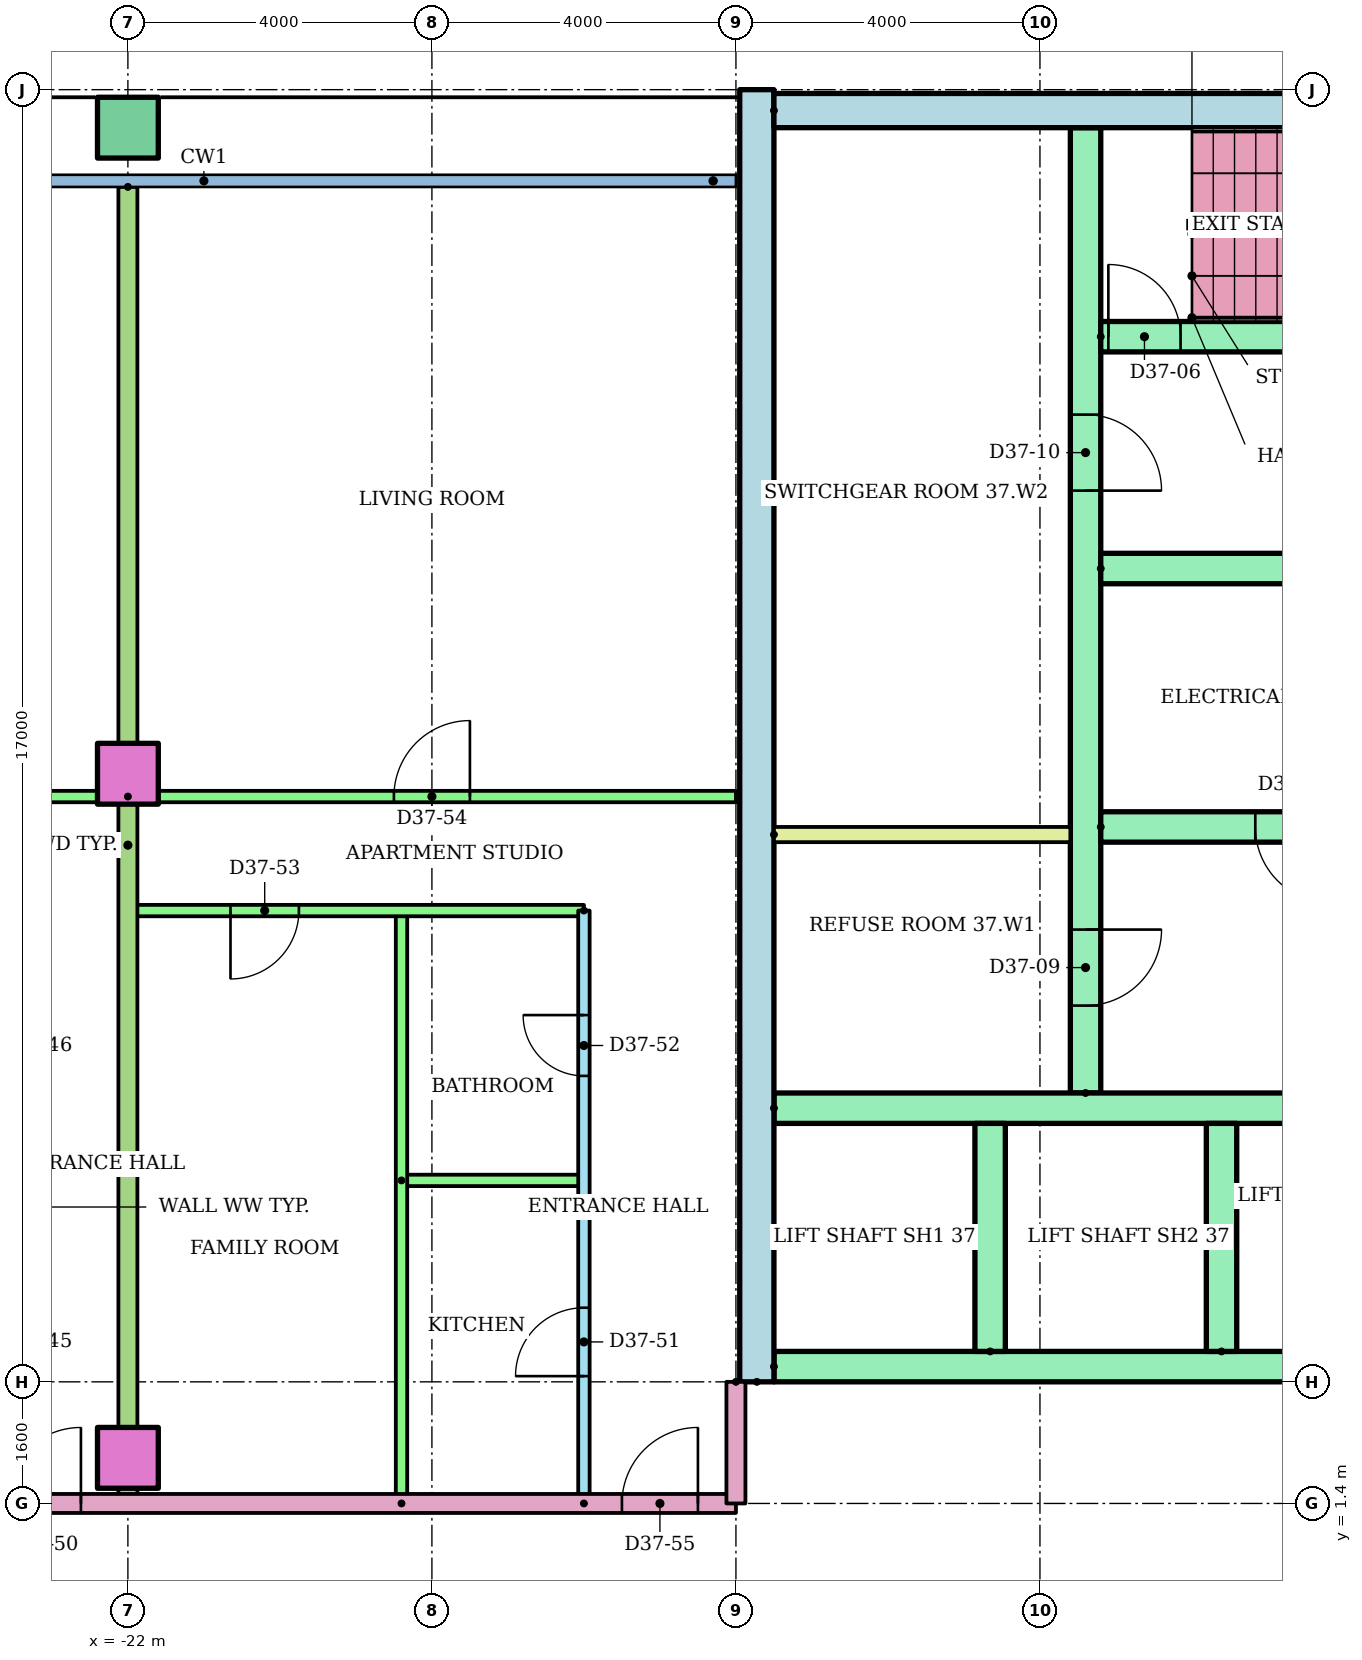
"""IFC4 building model, lengths in metres.
Left out: names, types, materials, properties, quantities, classifications, styles, units other than length and angle.
Written with IfcOpenShell. Run it as: python <this file> out.ifc"""

import sys

from ifc_helpers import new_model, si_unit, direction, frame, frame_2d, origin, origin_2d, place, context, subcontext, project, spatial, rectangle, hollow_rectangle, extrude, element, fill, save


model = new_model("IFC4")
c1 = context("Model", 3, precision=1e-05, world=origin(), true_north=direction((0.0, 1.0)))
c2 = subcontext(c1, "Body", "Model", "MODEL_VIEW")
j1 = project(units=[si_unit("LENGTHUNIT", "METRE"), si_unit("PLANEANGLEUNIT", "RADIAN")], contexts=[c1])
p1 = place(None, origin())
s1 = spatial("IfcSite", under=j1, at=p1, CompositionType="ELEMENT")
p2 = place(p1, origin())
s2 = spatial("IfcBuilding", under=s1, at=p2, CompositionType="ELEMENT")
p3 = place(p2, frame((0.0, 0.0, 142.2)))
s3 = spatial("IfcBuildingStorey", under=s2, at=p3, CompositionType="ELEMENT", Elevation=142.2)
for number, where in (
    (1, (-22.0, 2.0, 0.0)),
    (2, (-22.0, 11.0, 0.0)),
):
    element("IfcColumn", number, at=place(p3, frame(where)), inside=s3, PredefinedType="COLUMN", context=c2, shape_type="SweptSolid", body=[
        extrude(rectangle(XDim=0.8, YDim=0.8, at=origin_2d()), origin(), (0.0, 0.0, 1.0), 3.2),
    ])
p4 = place(p3, frame((-22.0, 19.5, 0.0)))
e3 = element("IfcColumn", 3, at=p4, inside=s3, PredefinedType="COLUMN", context=c2, shape_type="SweptSolid", body=[
    extrude(hollow_rectangle(XDim=0.8, YDim=0.8, WallThickness=0.04, at=origin_2d()), origin(), (0.0, 0.0, 1.0), 3.2),
])
p5 = place(p3, frame((-13.725, 3.0, 0.0), z_axis=(0.0, 0.0, 1.0), x_axis=(0.0, 1.0, 0.0)))
e4 = element("IfcWall", 4, at=p5, inside=s3, PredefinedType="SHEAR", context=c2, shape_type="SweptSolid", body=[
    extrude(rectangle(XDim=17.0, YDim=0.45, at=frame_2d((8.5, 0.0))), origin(), (0.0, 0.0, 1.0), 2.92),
])
p6 = place(p3, frame((-13.5, 19.725, 0.0)))
e5 = element("IfcWall", 5, at=p6, inside=s3, PredefinedType="SHEAR", context=c2, shape_type="SweptSolid", body=[
    extrude(rectangle(XDim=27.0, YDim=0.45, at=frame_2d((13.5, 0.0))), origin(), (0.0, 0.0, 1.0), 2.92),
])
p7 = place(p3, frame((-9.4, 6.8, 0.0), z_axis=(0.0, 0.0, 1.0), x_axis=(0.0, 1.0, 0.0)))
e6 = element("IfcWall", 6, at=p7, inside=s3, PredefinedType="SHEAR", context=c2, shape_type="SweptSolid", body=[
    extrude(rectangle(XDim=12.7, YDim=0.4, at=frame_2d((6.35, 0.0))), origin(), (0.0, 0.0, 1.0), 2.92),
])
p8 = place(p7, frame((1.15, 0.0, 0.0)))
e7 = element("IfcOpeningElement", 7, at=p8, cuts=e6, PredefinedType="OPENING", context=c2, shape_type="SweptSolid", body=[
    extrude(rectangle(XDim=1.0, YDim=2.1, at=frame_2d((0.5, 1.05))), frame((0.0, 0.21, 0.0), z_axis=(0.0, -1.0, 0.0), x_axis=(1.0, 0.0, 0.0)), (0.0, 0.0, 1.0), 0.42),
])
p9 = place(p7, frame((7.925, 0.0, 0.0)))
e8 = element("IfcOpeningElement", 8, at=p9, cuts=e6, PredefinedType="OPENING", context=c2, shape_type="SweptSolid", body=[
    extrude(rectangle(XDim=1.0, YDim=2.1, at=frame_2d((0.5, 1.05))), frame((0.0, 0.21, 0.0), z_axis=(0.0, -1.0, 0.0), x_axis=(1.0, 0.0, 0.0)), (0.0, 0.0, 1.0), 0.42),
])
p10 = place(p3, frame((-13.5, 3.2, 0.0)))
e9 = element("IfcWall", 9, at=p10, inside=s3, PredefinedType="SHEAR", context=c2, shape_type="SweptSolid", body=[
    extrude(rectangle(XDim=27.0, YDim=0.4, at=frame_2d((13.5, 0.0))), origin(), (0.0, 0.0, 1.0), 2.92),
])
p11 = place(p10, frame((6.861, 0.0, 0.0)))
e10 = element("IfcOpeningElement", 10, at=p11, cuts=e9, PredefinedType="OPENING", context=c2, shape_type="SweptSolid", body=[
    extrude(rectangle(XDim=1.1, YDim=2.1, at=frame_2d((0.55, 1.05))), frame((0.0, 0.21, 0.0), z_axis=(0.0, -1.0, 0.0), x_axis=(1.0, 0.0, 0.0)), (0.0, 0.0, 1.0), 0.42),
])
p12 = place(p10, frame((9.906, 0.0, 0.0)))
e11 = element("IfcOpeningElement", 11, at=p12, cuts=e9, PredefinedType="OPENING", context=c2, shape_type="SweptSolid", body=[
    extrude(rectangle(XDim=1.1, YDim=2.1, at=frame_2d((0.55, 1.05))), frame((0.0, 0.21, 0.0), z_axis=(0.0, -1.0, 0.0), x_axis=(1.0, 0.0, 0.0)), (0.0, 0.0, 1.0), 0.42),
])
p13 = place(p10, frame((15.994, 0.0, 0.0)))
e12 = element("IfcOpeningElement", 12, at=p13, cuts=e9, PredefinedType="OPENING", context=c2, shape_type="SweptSolid", body=[
    extrude(rectangle(XDim=1.1, YDim=2.1, at=frame_2d((0.55, 1.05))), frame((0.0, 0.21, 0.0), z_axis=(0.0, -1.0, 0.0), x_axis=(1.0, 0.0, 0.0)), (0.0, 0.0, 1.0), 0.42),
])
p14 = place(p10, frame((19.039, 0.0, 0.0)))
e13 = element("IfcOpeningElement", 13, at=p14, cuts=e9, PredefinedType="OPENING", context=c2, shape_type="SweptSolid", body=[
    extrude(rectangle(XDim=1.1, YDim=2.1, at=frame_2d((0.55, 1.05))), frame((0.0, 0.21, 0.0), z_axis=(0.0, -1.0, 0.0), x_axis=(1.0, 0.0, 0.0)), (0.0, 0.0, 1.0), 0.42),
])
p15 = place(p10, frame((12.6, 0.0, 0.0)))
e14 = element("IfcOpeningElement", 14, at=p15, cuts=e9, PredefinedType="OPENING", context=c2, shape_type="SweptSolid", body=[
    extrude(rectangle(XDim=1.8, YDim=2.1, at=frame_2d((0.9, 1.05))), frame((0.0, 0.21, 0.0), z_axis=(0.0, -1.0, 0.0), x_axis=(1.0, 0.0, 0.0)), (0.0, 0.0, 1.0), 0.42),
])
p16 = place(p3, frame((-13.5, 6.6, 0.0)))
e15 = element("IfcWall", 15, at=p16, inside=s3, PredefinedType="SHEAR", context=c2, shape_type="SweptSolid", body=[
    extrude(rectangle(XDim=11.978, YDim=0.4, at=frame_2d((5.989, 0.0))), origin(), (0.0, 0.0, 1.0), 2.92),
])
for number, where, z_axis, x_axis in (
    (16, (-10.656, 3.4, 0.0), (0.0, 0.0, 1.0), (0.0, 1.0, 0.0)),
    (17, (-7.611, 3.4, 0.0), (0.0, 0.0, 1.0), (0.0, 1.0, 0.0)),
):
    element("IfcWall", number, at=place(p3, frame(where, z_axis=z_axis, x_axis=x_axis)), inside=s3, PredefinedType="SHEAR", context=c2, shape_type="SweptSolid", body=[
        extrude(rectangle(XDim=3.0, YDim=0.4, at=frame_2d((1.5, 0.0))), origin(), (0.0, 0.0, 1.0), 2.92),
    ])
p17 = place(p3, frame((-9.2, 10.3, 0.0)))
e18 = element("IfcWall", 18, at=p17, inside=s3, PredefinedType="SHEAR", context=c2, shape_type="SweptSolid", body=[
    extrude(rectangle(XDim=8.0, YDim=0.4, at=frame_2d((4.0, 0.0))), origin(), (0.0, 0.0, 1.0), 2.92),
])
p18 = place(p17, frame((2.033, 0.0, 0.0)))
e19 = element("IfcOpeningElement", 19, at=p18, cuts=e18, PredefinedType="OPENING", context=c2, shape_type="SweptSolid", body=[
    extrude(rectangle(XDim=1.0, YDim=2.1, at=frame_2d((0.5, 1.05))), frame((0.0, 0.21, 0.0), z_axis=(0.0, -1.0, 0.0), x_axis=(1.0, 0.0, 0.0)), (0.0, 0.0, 1.0), 0.42),
])
p19 = place(p17, frame((6.133, 0.0, 0.0)))
e20 = element("IfcOpeningElement", 20, at=p19, cuts=e18, PredefinedType="OPENING", context=c2, shape_type="SweptSolid", body=[
    extrude(rectangle(XDim=1.0, YDim=2.1, at=frame_2d((0.5, 1.05))), frame((0.0, 0.21, 0.0), z_axis=(0.0, -1.0, 0.0), x_axis=(1.0, 0.0, 0.0)), (0.0, 0.0, 1.0), 0.42),
])
p20 = place(p3, frame((-9.2, 13.7, 0.0)))
e21 = element("IfcWall", 21, at=p20, inside=s3, PredefinedType="SHEAR", context=c2, shape_type="SweptSolid", body=[
    extrude(rectangle(XDim=8.0, YDim=0.4, at=frame_2d((4.0, 0.0))), origin(), (0.0, 0.0, 1.0), 2.92),
])
p21 = place(p3, frame((-9.2, 16.75, 0.0)))
e22 = element("IfcWall", 22, at=p21, inside=s3, PredefinedType="SHEAR", context=c2, shape_type="SweptSolid", body=[
    extrude(rectangle(XDim=18.4, YDim=0.4, at=frame_2d((9.2, 0.0))), origin(), (0.0, 0.0, 1.0), 2.92),
])
p22 = place(p21, frame((0.1, 0.0, 0.0)))
e23 = element("IfcOpeningElement", 23, at=p22, cuts=e22, PredefinedType="OPENING", context=c2, shape_type="SweptSolid", body=[
    extrude(rectangle(XDim=0.95, YDim=2.1, at=frame_2d((0.475, 1.05))), frame((0.0, 0.21, 0.0), z_axis=(0.0, -1.0, 0.0), x_axis=(1.0, 0.0, 0.0)), (0.0, 0.0, 1.0), 0.42),
])
p23 = place(p21, frame((6.1, 0.0, 0.0)))
e24 = element("IfcOpeningElement", 24, at=p23, cuts=e22, PredefinedType="OPENING", context=c2, shape_type="SweptSolid", body=[
    extrude(rectangle(XDim=0.95, YDim=2.1, at=frame_2d((0.475, 1.05))), frame((0.0, 0.21, 0.0), z_axis=(0.0, -1.0, 0.0), x_axis=(1.0, 0.0, 0.0)), (0.0, 0.0, 1.0), 0.42),
])
p24 = place(p21, frame((12.1, 0.0, 0.0)))
e25 = element("IfcOpeningElement", 25, at=p24, cuts=e22, PredefinedType="OPENING", context=c2, shape_type="SweptSolid", body=[
    extrude(rectangle(XDim=0.95, YDim=2.1, at=frame_2d((0.475, 1.05))), frame((0.0, 0.21, 0.0), z_axis=(0.0, -1.0, 0.0), x_axis=(1.0, 0.0, 0.0)), (0.0, 0.0, 1.0), 0.42),
])
p25 = place(p3, frame((-13.5, 10.2, 0.0)))
e26 = element("IfcWall", 26, at=p25, inside=s3, PredefinedType="PARTITIONING", context=c2, shape_type="SweptSolid", body=[
    extrude(rectangle(XDim=3.9, YDim=0.2, at=frame_2d((1.95, 0.0))), origin(), (0.0, 0.0, 1.0), 2.92),
])
p26 = place(p3, frame((-32.72, 10.7, 0.0)))
e27 = element("IfcWall", 27, at=p26, inside=s3, PredefinedType="PARTITIONING", context=c2, shape_type="SweptSolid", body=[
    extrude(rectangle(XDim=10.72, YDim=0.15, at=frame_2d((5.36, 0.0))), origin(), (0.0, 0.0, 1.0), 2.4),
])
p27 = place(p26, frame((1.102, 0.0, 0.0)))
e28 = element("IfcOpeningElement", 28, at=p27, cuts=e27, PredefinedType="OPENING", context=c2, shape_type="SweptSolid", body=[
    extrude(rectangle(XDim=1.0, YDim=2.1, at=frame_2d((0.5, 1.05))), frame((0.0, 0.085, 0.0), z_axis=(0.0, -1.0, 0.0), x_axis=(1.0, 0.0, 0.0)), (0.0, 0.0, 1.0), 0.17),
])
p28 = place(p26, frame((7.22, 0.0, 0.0)))
e29 = element("IfcOpeningElement", 29, at=p28, cuts=e27, PredefinedType="OPENING", context=c2, shape_type="SweptSolid", body=[
    extrude(rectangle(XDim=1.0, YDim=2.1, at=frame_2d((0.5, 1.05))), frame((0.0, 0.085, 0.0), z_axis=(0.0, -1.0, 0.0), x_axis=(1.0, 0.0, 0.0)), (0.0, 0.0, 1.0), 0.17),
])
p29 = place(p3, frame((-16.0, 1.4, 0.0), z_axis=(0.0, 0.0, 1.0), x_axis=(0.0, 1.0, 0.0)))
e30 = element("IfcWall", 30, at=p29, inside=s3, PredefinedType="PARTITIONING", context=c2, shape_type="SweptSolid", body=[
    extrude(rectangle(XDim=7.8, YDim=0.15, at=frame_2d((3.9, 0.0))), origin(), (0.0, 0.0, 1.0), 2.4),
])
p30 = place(p29, frame((1.675, 0.0, 0.0)))
e31 = element("IfcOpeningElement", 31, at=p30, cuts=e30, PredefinedType="OPENING", context=c2, shape_type="SweptSolid", body=[
    extrude(rectangle(XDim=0.9, YDim=2.1, at=frame_2d((0.45, 1.05))), frame((0.0, 0.085, 0.0), z_axis=(0.0, -1.0, 0.0), x_axis=(1.0, 0.0, 0.0)), (0.0, 0.0, 1.0), 0.17),
])
p31 = place(p29, frame((5.625, 0.0, 0.0)))
e32 = element("IfcOpeningElement", 32, at=p31, cuts=e30, PredefinedType="OPENING", context=c2, shape_type="SweptSolid", body=[
    extrude(rectangle(XDim=0.8, YDim=2.1, at=frame_2d((0.4, 1.05))), frame((0.0, 0.085, 0.0), z_axis=(0.0, -1.0, 0.0), x_axis=(1.0, 0.0, 0.0)), (0.0, 0.0, 1.0), 0.17),
])
p32 = place(p3, frame((-18.4, 5.65, 0.0)))
e33 = element("IfcWall", 33, at=p32, inside=s3, PredefinedType="PARTITIONING", context=c2, shape_type="SweptSolid", body=[
    extrude(rectangle(XDim=2.4, YDim=0.15, at=frame_2d((1.2, 0.0))), origin(), (0.0, 0.0, 1.0), 2.4),
])
p33 = place(p3, frame((-18.4, 1.4, 0.0), z_axis=(0.0, 0.0, 1.0), x_axis=(0.0, 1.0, 0.0)))
e34 = element("IfcWall", 34, at=p33, inside=s3, PredefinedType="PARTITIONING", context=c2, shape_type="SweptSolid", body=[
    extrude(rectangle(XDim=7.8, YDim=0.15, at=frame_2d((3.9, 0.0))), origin(), (0.0, 0.0, 1.0), 2.4),
])
p34 = place(p3, frame((-16.0, 9.2, 0.0), z_axis=(0.0, 0.0, 1.0), x_axis=(-1.0, 0.0, 0.0)))
e35 = element("IfcWall", 35, at=p34, inside=s3, PredefinedType="PARTITIONING", context=c2, shape_type="SweptSolid", body=[
    extrude(rectangle(XDim=6.0, YDim=0.15, at=frame_2d((3.0, 0.0))), origin(), (0.0, 0.0, 1.0), 2.4),
])
p35 = place(p34, frame((3.75, 0.0, 0.0)))
e36 = element("IfcOpeningElement", 36, at=p35, cuts=e35, PredefinedType="OPENING", context=c2, shape_type="SweptSolid", body=[
    extrude(rectangle(XDim=0.9, YDim=2.1, at=frame_2d((0.45, 1.05))), frame((0.0, 0.085, 0.0), z_axis=(0.0, -1.0, 0.0), x_axis=(1.0, 0.0, 0.0)), (0.0, 0.0, 1.0), 0.17),
])
p36 = place(p3, frame((-22.0, 10.7, 0.0)))
e37 = element("IfcWall", 37, at=p36, inside=s3, PredefinedType="PARTITIONING", context=c2, shape_type="SweptSolid", body=[
    extrude(rectangle(XDim=8.0, YDim=0.15, at=frame_2d((4.0, 0.0))), origin(), (0.0, 0.0, 1.0), 2.4),
])
p37 = place(p36, frame((3.5, 0.0, 0.0)))
e38 = element("IfcOpeningElement", 38, at=p37, cuts=e37, PredefinedType="OPENING", context=c2, shape_type="SweptSolid", body=[
    extrude(rectangle(XDim=1.0, YDim=2.1, at=frame_2d((0.5, 1.05))), frame((0.0, 0.085, 0.0), z_axis=(0.0, -1.0, 0.0), x_axis=(1.0, 0.0, 0.0)), (0.0, 0.0, 1.0), 0.17),
])
p38 = place(p3, frame((-22.0, 18.721, 0.0), z_axis=(0.0, 0.0, 1.0), x_axis=(0.0, -1.0, 0.0)))
e39 = element("IfcWall", 39, at=p38, inside=s3, PredefinedType="PARTITIONING", context=c2, shape_type="SweptSolid", body=[
    extrude(rectangle(XDim=17.321, YDim=0.25, at=frame_2d((8.661, 0.0))), origin(), (0.0, 0.0, 1.0), 2.4),
])
p39 = place(p3, frame((-29.0, 1.4, 0.0)))
e40 = element("IfcWall", 40, at=p39, inside=s3, PredefinedType="PARTITIONING", context=c2, shape_type="SweptSolid", body=[
    extrude(rectangle(XDim=15.0, YDim=0.25, at=frame_2d((7.5, 0.0))), origin(), (0.0, 0.0, 1.0), 2.4),
])
p40 = place(p39, frame((5.382, 0.0, 0.0)))
e41 = element("IfcOpeningElement", 41, at=p40, cuts=e40, PredefinedType="OPENING", context=c2, shape_type="SweptSolid", body=[
    extrude(rectangle(XDim=1.0, YDim=2.1, at=frame_2d((0.5, 1.05))), frame((0.0, 0.135, 0.0), z_axis=(0.0, -1.0, 0.0), x_axis=(1.0, 0.0, 0.0)), (0.0, 0.0, 1.0), 0.27),
])
p41 = place(p39, frame((13.5, 0.0, 0.0)))
e42 = element("IfcOpeningElement", 42, at=p41, cuts=e40, PredefinedType="OPENING", context=c2, shape_type="SweptSolid", body=[
    extrude(rectangle(XDim=1.0, YDim=2.1, at=frame_2d((0.5, 1.05))), frame((0.0, 0.135, 0.0), z_axis=(0.0, -1.0, 0.0), x_axis=(1.0, 0.0, 0.0)), (0.0, 0.0, 1.0), 0.27),
])
p42 = place(p3, frame((-14.0, 3.0, 0.0), z_axis=(0.0, 0.0, 1.0), x_axis=(0.0, -1.0, 0.0)))
e43 = element("IfcWall", 43, at=p42, inside=s3, PredefinedType="PARTITIONING", context=c2, shape_type="SweptSolid", body=[
    extrude(rectangle(XDim=1.6, YDim=0.25, at=frame_2d((0.8, 0.0))), origin(), (0.0, 0.0, 1.0), 2.4),
])
p43 = place(p18, frame((1.0, 0.0, 0.0), z_axis=(0.0, 0.0, 1.0), x_axis=(-1.0, 0.0, 0.0)))
e44 = element("IfcDoor", 44, at=p43, inside=s3, OperationType="SINGLE_SWING_RIGHT", PredefinedType="DOOR", context=c2, shape_type="SweptSolid", body=[
    extrude(rectangle(XDim=1.0, YDim=2.1, at=frame_2d((0.5, 1.05))), frame((0.0, 0.025, 0.0), z_axis=(0.0, -1.0, 0.0), x_axis=(1.0, 0.0, 0.0)), (0.0, 0.0, 1.0), 0.05),
])
fill(e19, e44)
p44 = place(p22, origin())
e45 = element("IfcDoor", 45, at=p44, inside=s3, OperationType="SINGLE_SWING_LEFT", PredefinedType="DOOR", context=c2, shape_type="SweptSolid", body=[
    extrude(rectangle(XDim=0.95, YDim=2.1, at=frame_2d((0.475, 1.05))), frame((0.0, 0.025, 0.0), z_axis=(0.0, -1.0, 0.0), x_axis=(1.0, 0.0, 0.0)), (0.0, 0.0, 1.0), 0.05),
])
fill(e23, e45)
p45 = place(p8, frame((1.0, 0.0, 0.0), z_axis=(0.0, 0.0, 1.0), x_axis=(-1.0, 0.0, 0.0)))
e46 = element("IfcDoor", 46, at=p45, inside=s3, OperationType="SINGLE_SWING_RIGHT", PredefinedType="DOOR", context=c2, shape_type="SweptSolid", body=[
    extrude(rectangle(XDim=1.0, YDim=2.1, at=frame_2d((0.5, 1.05))), frame((0.0, 0.025, 0.0), z_axis=(0.0, -1.0, 0.0), x_axis=(1.0, 0.0, 0.0)), (0.0, 0.0, 1.0), 0.05),
])
fill(e7, e46)
p46 = place(p9, frame((1.0, 0.0, 0.0), z_axis=(0.0, 0.0, 1.0), x_axis=(-1.0, 0.0, 0.0)))
e47 = element("IfcDoor", 47, at=p46, inside=s3, OperationType="SINGLE_SWING_LEFT", PredefinedType="DOOR", context=c2, shape_type="SweptSolid", body=[
    extrude(rectangle(XDim=1.0, YDim=2.1, at=frame_2d((0.5, 1.05))), frame((0.0, 0.025, 0.0), z_axis=(0.0, -1.0, 0.0), x_axis=(1.0, 0.0, 0.0)), (0.0, 0.0, 1.0), 0.05),
])
fill(e8, e47)
p47 = place(p40, origin())
e48 = element("IfcDoor", 48, at=p47, inside=s3, OperationType="SINGLE_SWING_RIGHT", PredefinedType="DOOR", context=c2, shape_type="SweptSolid", body=[
    extrude(rectangle(XDim=1.0, YDim=2.1, at=frame_2d((0.5, 1.05))), frame((0.0, 0.025, 0.0), z_axis=(0.0, -1.0, 0.0), x_axis=(1.0, 0.0, 0.0)), (0.0, 0.0, 1.0), 0.05),
])
fill(e41, e48)
p48 = place(p30, origin())
e49 = element("IfcDoor", 49, at=p48, inside=s3, OperationType="SINGLE_SWING_LEFT", PredefinedType="DOOR", context=c2, shape_type="SweptSolid", body=[
    extrude(rectangle(XDim=0.9, YDim=2.1, at=frame_2d((0.45, 1.05))), frame((0.0, 0.025, 0.0), z_axis=(0.0, -1.0, 0.0), x_axis=(1.0, 0.0, 0.0)), (0.0, 0.0, 1.0), 0.05),
])
fill(e31, e49)
p49 = place(p31, origin())
e50 = element("IfcDoor", 50, at=p49, inside=s3, OperationType="SINGLE_SWING_RIGHT", PredefinedType="DOOR", context=c2, shape_type="SweptSolid", body=[
    extrude(rectangle(XDim=0.8, YDim=2.1, at=frame_2d((0.4, 1.05))), frame((0.0, 0.025, 0.0), z_axis=(0.0, -1.0, 0.0), x_axis=(1.0, 0.0, 0.0)), (0.0, 0.0, 1.0), 0.05),
])
fill(e32, e50)
p50 = place(p35, origin())
e51 = element("IfcDoor", 51, at=p50, inside=s3, OperationType="SINGLE_SWING_RIGHT", PredefinedType="DOOR", context=c2, shape_type="SweptSolid", body=[
    extrude(rectangle(XDim=0.9, YDim=2.1, at=frame_2d((0.45, 1.05))), frame((0.0, 0.025, 0.0), z_axis=(0.0, -1.0, 0.0), x_axis=(1.0, 0.0, 0.0)), (0.0, 0.0, 1.0), 0.05),
])
fill(e36, e51)
p51 = place(p37, origin())
e52 = element("IfcDoor", 52, at=p51, inside=s3, OperationType="SINGLE_SWING_RIGHT", PredefinedType="DOOR", context=c2, shape_type="SweptSolid", body=[
    extrude(rectangle(XDim=1.0, YDim=2.1, at=frame_2d((0.5, 1.05))), frame((0.0, 0.025, 0.0), z_axis=(0.0, -1.0, 0.0), x_axis=(1.0, 0.0, 0.0)), (0.0, 0.0, 1.0), 0.05),
])
fill(e38, e52)
p52 = place(p41, origin())
e53 = element("IfcDoor", 53, at=p52, inside=s3, OperationType="SINGLE_SWING_RIGHT", PredefinedType="DOOR", context=c2, shape_type="SweptSolid", body=[
    extrude(rectangle(XDim=1.0, YDim=2.1, at=frame_2d((0.5, 1.05))), frame((0.0, 0.025, 0.0), z_axis=(0.0, -1.0, 0.0), x_axis=(1.0, 0.0, 0.0)), (0.0, 0.0, 1.0), 0.05),
])
fill(e42, e53)
save(model, sys.argv[1])
